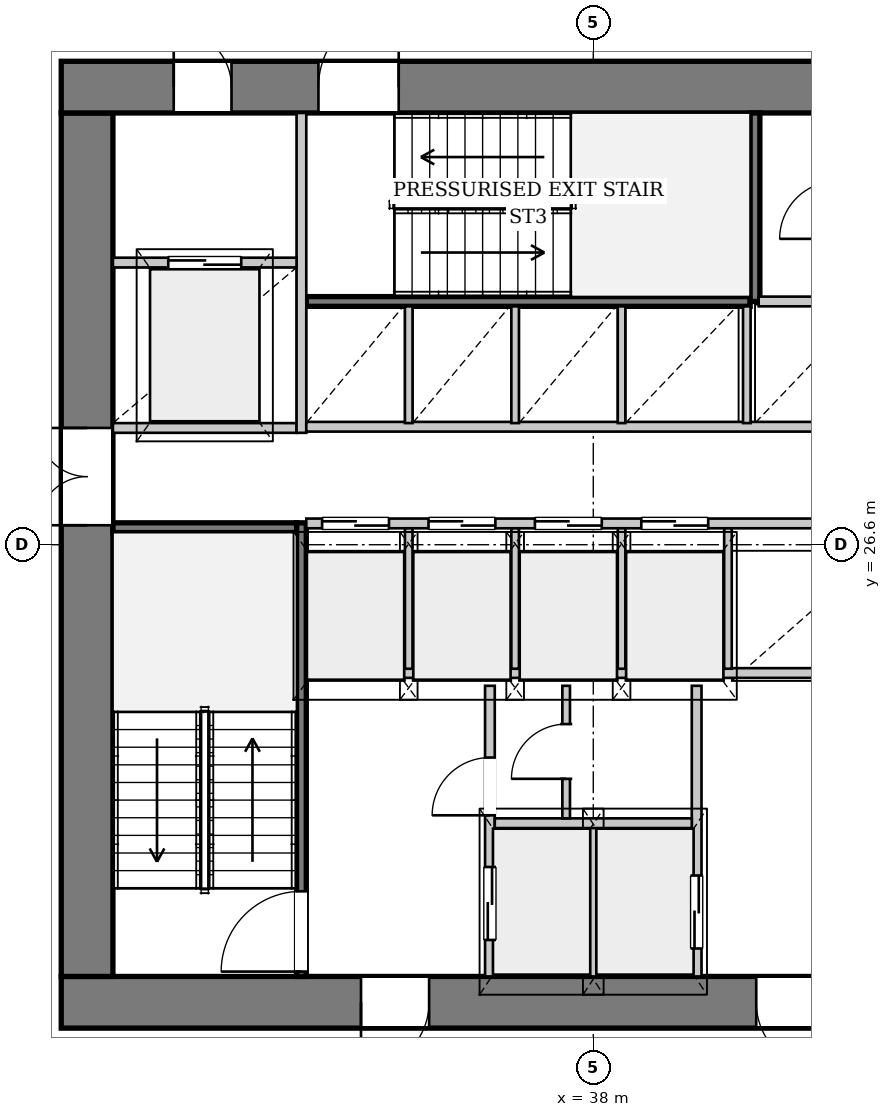
"""IFC4 building model, lengths in metres.
Left out: names, types, materials, properties, quantities, classifications, styles, units other than length and angle.
Written with IfcOpenShell. Run it as: python <this file> out.ifc"""

import sys

from ifc_helpers import new_model, si_unit, direction, frame, frame_2d, origin, place, context, subcontext, project, spatial, rectangle, extrude, source, transform, mapped, element, fill, save


model = new_model("IFC4")
c1 = context("Model", 3, precision=1e-05, world=origin(), true_north=direction((0.0, 1.0)))
c2 = subcontext(c1, "Body", "Model", "MODEL_VIEW")
j1 = project(units=[si_unit("LENGTHUNIT", "METRE"), si_unit("PLANEANGLEUNIT", "RADIAN")], contexts=[c1])
p1 = place(None, origin())
s1 = spatial("IfcSite", under=j1, at=p1, CompositionType="ELEMENT")
p2 = place(p1, origin())
s2 = spatial("IfcBuilding", under=s1, at=p2, CompositionType="ELEMENT")
p3 = place(p2, frame((0.0, 0.0, 61.25)))
s3 = spatial("IfcBuildingStorey", under=s2, at=p3, CompositionType="ELEMENT", Elevation=61.25)
p4 = place(p3, frame((46.75, 19.075, 0.0), z_axis=(0.0, 0.0, 1.0), x_axis=(-1.0, 0.0, 0.0)))
e1 = element("IfcWall", 1, at=p4, inside=s3, PredefinedType="SHEAR", context=c2, shape_type="SweptSolid", body=[
    extrude(rectangle(XDim=17.5, YDim=0.85, at=frame_2d((8.75, 0.0))), origin(), (0.0, 0.0, 1.0), 3.3),
])
p5 = place(p4, frame((4.95, 0.0, 0.0)))
e2 = element("IfcOpeningElement", 2, at=p5, cuts=e1, PredefinedType="OPENING", context=c2, shape_type="SweptSolid", body=[
    extrude(rectangle(XDim=1.12, YDim=2.25, at=frame_2d((0.56, 1.125))), frame((0.0, 0.435, 0.0), z_axis=(0.0, -1.0, 0.0), x_axis=(1.0, 0.0, 0.0)), (0.0, 0.0, 1.0), 0.87),
])
p6 = place(p4, frame((11.45, 0.0, 0.0)))
e3 = element("IfcOpeningElement", 3, at=p6, cuts=e1, PredefinedType="OPENING", context=c2, shape_type="SweptSolid", body=[
    extrude(rectangle(XDim=1.12, YDim=2.25, at=frame_2d((0.56, 1.125))), frame((0.0, 0.435, 0.0), z_axis=(0.0, -1.0, 0.0), x_axis=(1.0, 0.0, 0.0)), (0.0, 0.0, 1.0), 0.87),
])
p7 = place(p3, frame((29.675, 19.5, 0.0), z_axis=(0.0, 0.0, 1.0), x_axis=(0.0, 1.0, 0.0)))
e4 = element("IfcWall", 4, at=p7, inside=s3, PredefinedType="SHEAR", context=c2, shape_type="SweptSolid", body=[
    extrude(rectangle(XDim=14.2, YDim=0.85, at=frame_2d((7.1, 0.0))), origin(), (0.0, 0.0, 1.0), 3.3),
])
p8 = place(p7, frame((7.42, 0.0, 0.0)))
e5 = element("IfcOpeningElement", 5, at=p8, cuts=e4, PredefinedType="OPENING", context=c2, shape_type="SweptSolid", body=[
    extrude(rectangle(XDim=1.6, YDim=2.2, at=frame_2d((0.8, 1.1))), frame((0.0, 0.435, 0.0), z_axis=(0.0, -1.0, 0.0), x_axis=(1.0, 0.0, 0.0)), (0.0, 0.0, 1.0), 0.87),
])
p9 = place(p3, frame((29.25, 34.125, 0.0), z_axis=(0.0, 0.0, 1.0), x_axis=(1.0, 0.0, 0.0)))
e6 = element("IfcWall", 6, at=p9, inside=s3, PredefinedType="SHEAR", context=c2, shape_type="SweptSolid", body=[
    extrude(rectangle(XDim=17.5, YDim=0.85, at=frame_2d((8.75, 0.0))), origin(), (0.0, 0.0, 1.0), 3.3),
])
p10 = place(p9, frame((1.85, 0.0, 0.0)))
e7 = element("IfcOpeningElement", 7, at=p10, cuts=e6, PredefinedType="OPENING", context=c2, shape_type="SweptSolid", body=[
    extrude(rectangle(XDim=0.95, YDim=2.1, at=frame_2d((0.475, 1.05))), frame((0.0, 0.435, 0.0), z_axis=(0.0, -1.0, 0.0), x_axis=(1.0, 0.0, 0.0)), (0.0, 0.0, 1.0), 0.87),
])
p11 = place(p9, frame((4.23, 0.0, 0.0)))
e8 = element("IfcOpeningElement", 8, at=p11, cuts=e6, PredefinedType="OPENING", context=c2, shape_type="SweptSolid", body=[
    extrude(rectangle(XDim=1.32, YDim=2.2, at=frame_2d((0.66, 1.1))), frame((0.0, 0.435, 0.0), z_axis=(0.0, -1.0, 0.0), x_axis=(1.0, 0.0, 0.0)), (0.0, 0.0, 1.0), 0.87),
])
p12 = place(p9, frame((15.3, 0.0, 0.0)))
e9 = element("IfcOpeningElement", 9, at=p12, cuts=e6, PredefinedType="OPENING", context=c2, shape_type="SweptSolid", body=[
    extrude(rectangle(XDim=0.95, YDim=2.1, at=frame_2d((0.475, 1.05))), frame((0.0, 0.435, 0.0), z_axis=(0.0, -1.0, 0.0), x_axis=(1.0, 0.0, 0.0)), (0.0, 0.0, 1.0), 0.87),
])
p13 = place(p3, frame((33.2, 19.5, 0.0), z_axis=(0.0, 0.0, 1.0), x_axis=(0.0, 1.0, 0.0)))
e10 = element("IfcWall", 10, at=p13, inside=s3, PredefinedType="PARTITIONING", context=c2, shape_type="SweptSolid", body=[
    extrude(rectangle(XDim=7.46, YDim=0.16, at=frame_2d((3.73, 0.0))), origin(), (0.0, 0.0, 1.0), 3.3),
])
p14 = place(p13, frame((0.08, 0.0, 0.0)))
e11 = element("IfcOpeningElement", 11, at=p14, cuts=e10, PredefinedType="OPENING", context=c2, shape_type="SweptSolid", body=[
    extrude(rectangle(XDim=1.32, YDim=2.2, at=frame_2d((0.66, 1.1))), frame((0.0, 0.09, 0.0), z_axis=(0.0, -1.0, 0.0), x_axis=(1.0, 0.0, 0.0)), (0.0, 0.0, 1.0), 0.18),
])
p15 = place(p3, frame((30.1, 26.88, 0.0), z_axis=(0.0, 0.0, 1.0), x_axis=(1.0, 0.0, 0.0)))
e12 = element("IfcWall", 12, at=p15, inside=s3, PredefinedType="PARTITIONING", context=c2, shape_type="SweptSolid", body=[
    extrude(rectangle(XDim=3.02, YDim=0.16, at=frame_2d((1.51, 0.0))), origin(), (0.0, 0.0, 1.0), 3.3),
])
p16 = place(p3, frame((33.28, 30.6, 0.0), z_axis=(0.0, 0.0, 1.0), x_axis=(1.0, 0.0, 0.0)))
e13 = element("IfcWall", 13, at=p16, inside=s3, PredefinedType="PARTITIONING", context=c2, shape_type="SweptSolid", body=[
    extrude(rectangle(XDim=7.3, YDim=0.16, at=frame_2d((3.65, 0.0))), origin(), (0.0, 0.0, 1.0), 3.3),
])
p17 = place(p3, frame((40.66, 30.6, 0.0), z_axis=(0.0, 0.0, 1.0), x_axis=(0.0, 1.0, 0.0)))
e14 = element("IfcWall", 14, at=p17, inside=s3, PredefinedType="PARTITIONING", context=c2, shape_type="SweptSolid", body=[
    extrude(rectangle(XDim=3.1, YDim=0.16, at=frame_2d((1.55, 0.0))), origin(), (0.0, 0.0, 1.0), 3.3),
])
p18 = place(p3, frame((36.3, 19.5, 0.0), z_axis=(0.0, 0.0, 1.0), x_axis=(0.0, 1.0, 0.0)))
e15 = element("IfcWall", 15, at=p18, inside=s3, PredefinedType="PARTITIONING", context=c2, shape_type="SweptSolid", body=[
    extrude(rectangle(XDim=4.78, YDim=0.16, at=frame_2d((2.39, 0.0))), origin(), (0.0, 0.0, 1.0), 3.3),
])
p19 = place(p18, frame((0.6, 0.0, 0.0)))
e16 = element("IfcOpeningElement", 16, at=p19, cuts=e15, PredefinedType="OPENING", context=c2, shape_type="SweptSolid", body=[
    extrude(rectangle(XDim=1.2, YDim=2.2, at=frame_2d((0.6, 1.1))), frame((0.0, 0.09, 0.0), z_axis=(0.0, -1.0, 0.0), x_axis=(1.0, 0.0, 0.0)), (0.0, 0.0, 1.0), 0.18),
])
p20 = place(p18, frame((2.65, 0.0, 0.0)))
e17 = element("IfcOpeningElement", 17, at=p20, cuts=e15, PredefinedType="OPENING", context=c2, shape_type="SweptSolid", body=[
    extrude(rectangle(XDim=0.95, YDim=2.1, at=frame_2d((0.475, 1.05))), frame((0.0, 0.09, 0.0), z_axis=(0.0, -1.0, 0.0), x_axis=(1.0, 0.0, 0.0)), (0.0, 0.0, 1.0), 0.18),
])
p21 = place(p3, frame((39.7, 24.28, 0.0), z_axis=(0.0, 0.0, 1.0), x_axis=(0.0, -1.0, 0.0)))
e18 = element("IfcWall", 18, at=p21, inside=s3, PredefinedType="PARTITIONING", context=c2, shape_type="SweptSolid", body=[
    extrude(rectangle(XDim=4.78, YDim=0.16, at=frame_2d((2.39, 0.0))), origin(), (0.0, 0.0, 1.0), 3.3),
])
p22 = place(p21, frame((3.12, 0.0, 0.0)))
e19 = element("IfcOpeningElement", 19, at=p22, cuts=e18, PredefinedType="OPENING", context=c2, shape_type="SweptSolid", body=[
    extrude(rectangle(XDim=1.2, YDim=2.2, at=frame_2d((0.6, 1.1))), frame((0.0, 0.09, 0.0), z_axis=(0.0, -1.0, 0.0), x_axis=(1.0, 0.0, 0.0)), (0.0, 0.0, 1.0), 0.18),
])
p23 = place(p3, frame((38.0, 19.5, 0.0), z_axis=(0.0, 0.0, 1.0), x_axis=(0.0, 1.0, 0.0)))
e20 = element("IfcWall", 20, at=p23, inside=s3, PredefinedType="PARTITIONING", context=c2, shape_type="SweptSolid", body=[
    extrude(rectangle(XDim=2.46, YDim=0.125, at=frame_2d((1.23, 0.0))), origin(), (0.0, 0.0, 1.0), 3.3),
])
p24 = place(p3, frame((36.38, 22.02, 0.0), z_axis=(0.0, 0.0, 1.0), x_axis=(1.0, 0.0, 0.0)))
e21 = element("IfcWall", 21, at=p24, inside=s3, PredefinedType="PARTITIONING", context=c2, shape_type="SweptSolid", body=[
    extrude(rectangle(XDim=3.24, YDim=0.16, at=frame_2d((1.62, 0.0))), origin(), (0.0, 0.0, 1.0), 3.3),
])
p25 = place(p3, frame((33.28, 24.49, 0.0), z_axis=(0.0, 0.0, 1.0), x_axis=(1.0, 0.0, 0.0)))
e22 = element("IfcWall", 22, at=p25, inside=s3, PredefinedType="PARTITIONING", context=c2, shape_type="SweptSolid", body=[
    extrude(rectangle(XDim=9.44, YDim=0.16, at=frame_2d((4.72, 0.0))), origin(), (0.0, 0.0, 1.0), 3.3),
])
p26 = place(p3, frame((37.554, 22.1, 0.0), z_axis=(0.0, 0.0, 1.0), x_axis=(0.0, 1.0, 0.0)))
e23 = element("IfcWall", 23, at=p26, inside=s3, PredefinedType="PARTITIONING", context=c2, shape_type="SweptSolid", body=[
    extrude(rectangle(XDim=2.18, YDim=0.125, at=frame_2d((1.09, 0.0))), origin(), (0.0, 0.0, 1.0), 3.3),
])
p27 = place(p26, frame((0.65, 0.0, 0.0)))
e24 = element("IfcOpeningElement", 24, at=p27, cuts=e23, PredefinedType="OPENING", context=c2, shape_type="SweptSolid", body=[
    extrude(rectangle(XDim=0.9, YDim=2.1, at=frame_2d((0.45, 1.05))), frame((0.0, 0.073, 0.0), z_axis=(0.0, -1.0, 0.0), x_axis=(1.0, 0.0, 0.0)), (0.0, 0.0, 1.0), 0.145),
])
p28 = place(p3, frame((30.1, 28.52, 0.0), z_axis=(0.0, 0.0, 1.0), x_axis=(1.0, 0.0, 0.0)))
e25 = element("IfcWall", 25, at=p28, inside=s3, PredefinedType="PARTITIONING", context=c2, shape_type="SweptSolid", body=[
    extrude(rectangle(XDim=3.02, YDim=0.16, at=frame_2d((1.51, 0.0))), origin(), (0.0, 0.0, 1.0), 3.3),
])
p29 = place(p3, frame((33.2, 28.44, 0.0), z_axis=(0.0, 0.0, 1.0), x_axis=(0.0, 1.0, 0.0)))
e26 = element("IfcWall", 26, at=p29, inside=s3, PredefinedType="PARTITIONING", context=c2, shape_type="SweptSolid", body=[
    extrude(rectangle(XDim=5.26, YDim=0.16, at=frame_2d((2.63, 0.0))), origin(), (0.0, 0.0, 1.0), 3.3),
])
p30 = place(p3, frame((30.1, 31.24, 0.0), z_axis=(0.0, 0.0, 1.0), x_axis=(1.0, 0.0, 0.0)))
e27 = element("IfcWall", 27, at=p30, inside=s3, PredefinedType="PARTITIONING", context=c2, shape_type="SweptSolid", body=[
    extrude(rectangle(XDim=3.02, YDim=0.16, at=frame_2d((1.51, 0.0))), origin(), (0.0, 0.0, 1.0), 3.3),
])
p31 = place(p30, frame((0.91, 0.0, 0.0)))
e28 = element("IfcOpeningElement", 28, at=p31, cuts=e27, PredefinedType="OPENING", context=c2, shape_type="SweptSolid", body=[
    extrude(rectangle(XDim=1.2, YDim=2.2, at=frame_2d((0.6, 1.1))), frame((0.0, 0.09, 0.0), z_axis=(0.0, -1.0, 0.0), x_axis=(1.0, 0.0, 0.0)), (0.0, 0.0, 1.0), 0.18),
])
p32 = place(p3, frame((33.28, 26.95, 0.0), z_axis=(0.0, 0.0, 1.0), x_axis=(1.0, 0.0, 0.0)))
e29 = element("IfcWall", 29, at=p32, inside=s3, PredefinedType="PARTITIONING", context=c2, shape_type="SweptSolid", body=[
    extrude(rectangle(XDim=9.44, YDim=0.16, at=frame_2d((4.72, 0.0))), origin(), (0.0, 0.0, 1.0), 3.3),
])
p33 = place(p32, frame((0.26, 0.0, 0.0)))
e30 = element("IfcOpeningElement", 30, at=p33, cuts=e29, PredefinedType="OPENING", context=c2, shape_type="SweptSolid", body=[
    extrude(rectangle(XDim=1.1, YDim=2.2, at=frame_2d((0.55, 1.1))), frame((0.0, 0.09, 0.0), z_axis=(0.0, -1.0, 0.0), x_axis=(1.0, 0.0, 0.0)), (0.0, 0.0, 1.0), 0.18),
])
p34 = place(p32, frame((2.01, 0.0, 0.0)))
e31 = element("IfcOpeningElement", 31, at=p34, cuts=e29, PredefinedType="OPENING", context=c2, shape_type="SweptSolid", body=[
    extrude(rectangle(XDim=1.1, YDim=2.2, at=frame_2d((0.55, 1.1))), frame((0.0, 0.09, 0.0), z_axis=(0.0, -1.0, 0.0), x_axis=(1.0, 0.0, 0.0)), (0.0, 0.0, 1.0), 0.18),
])
p35 = place(p32, frame((3.76, 0.0, 0.0)))
e32 = element("IfcOpeningElement", 32, at=p35, cuts=e29, PredefinedType="OPENING", context=c2, shape_type="SweptSolid", body=[
    extrude(rectangle(XDim=1.1, YDim=2.2, at=frame_2d((0.55, 1.1))), frame((0.0, 0.09, 0.0), z_axis=(0.0, -1.0, 0.0), x_axis=(1.0, 0.0, 0.0)), (0.0, 0.0, 1.0), 0.18),
])
p36 = place(p32, frame((5.51, 0.0, 0.0)))
e33 = element("IfcOpeningElement", 33, at=p36, cuts=e29, PredefinedType="OPENING", context=c2, shape_type="SweptSolid", body=[
    extrude(rectangle(XDim=1.1, YDim=2.2, at=frame_2d((0.55, 1.1))), frame((0.0, 0.09, 0.0), z_axis=(0.0, -1.0, 0.0), x_axis=(1.0, 0.0, 0.0)), (0.0, 0.0, 1.0), 0.18),
])
for number, where, z_axis, x_axis in (
    (34, (34.965, 24.56, 0.0), (0.0, 0.0, 1.0), (0.0, 1.0, 0.0)),
    (35, (36.715, 24.56, 0.0), (0.0, 0.0, 1.0), (0.0, 1.0, 0.0)),
    (36, (38.465, 24.56, 0.0), (0.0, 0.0, 1.0), (0.0, 1.0, 0.0)),
    (37, (40.215, 24.56, 0.0), (0.0, 0.0, 1.0), (0.0, 1.0, 0.0)),
):
    element("IfcWall", number, at=place(p3, frame(where, z_axis=z_axis, x_axis=x_axis)), inside=s3, PredefinedType="PARTITIONING", context=c2, shape_type="SweptSolid", body=[
        extrude(rectangle(XDim=2.31, YDim=0.125, at=frame_2d((1.155, 0.0))), origin(), (0.0, 0.0, 1.0), 3.3),
    ])
p37 = place(p3, frame((33.28, 28.54, 0.0), z_axis=(0.0, 0.0, 1.0), x_axis=(1.0, 0.0, 0.0)))
e38 = element("IfcWall", 38, at=p37, inside=s3, PredefinedType="PARTITIONING", context=c2, shape_type="SweptSolid", body=[
    extrude(rectangle(XDim=12.62, YDim=0.16, at=frame_2d((6.31, 0.0))), origin(), (0.0, 0.0, 1.0), 3.3),
])
p38 = place(p3, frame((40.72, 30.6, 0.0), z_axis=(0.0, 0.0, 1.0), x_axis=(1.0, 0.0, 0.0)))
e39 = element("IfcWall", 39, at=p38, inside=s3, PredefinedType="PARTITIONING", context=c2, shape_type="SweptSolid", body=[
    extrude(rectangle(XDim=5.18, YDim=0.16, at=frame_2d((2.59, 0.0))), origin(), (0.0, 0.0, 1.0), 3.3),
])
for number, where, z_axis, x_axis in (
    (40, (34.965, 28.6, 0.0), (0.0, 0.0, 1.0), (0.0, 1.0, 0.0)),
    (41, (36.715, 28.6, 0.0), (0.0, 0.0, 1.0), (0.0, 1.0, 0.0)),
    (42, (38.465, 28.6, 0.0), (0.0, 0.0, 1.0), (0.0, 1.0, 0.0)),
    (43, (40.525, 28.6, 0.0), (0.0, 0.0, 1.0), (0.0, 1.0, 0.0)),
):
    element("IfcWall", number, at=place(p3, frame(where, z_axis=z_axis, x_axis=x_axis)), inside=s3, PredefinedType="PARTITIONING", context=c2, shape_type="SweptSolid", body=[
        extrude(rectangle(XDim=1.92, YDim=0.125, at=frame_2d((0.96, 0.0))), origin(), (0.0, 0.0, 1.0), 3.3),
    ])
m1 = source(origin(), c2, "Body", "SweptSolid", [
    extrude(rectangle(XDim=1.12, YDim=2.25, at=frame_2d((0.56, 1.125))), frame((0.0, 0.025, 0.0), z_axis=(0.0, -1.0, 0.0), x_axis=(1.0, 0.0, 0.0)), (0.0, 0.0, 1.0), 0.05),
])
p39 = place(p5, origin())
e44 = element("IfcDoor", 44, at=p39, inside=s3, OperationType="SINGLE_SWING_LEFT", PredefinedType="DOOR", context=c2, shape_type="MappedRepresentation", body=[
    mapped(m1, transform((0.0, 0.0, 0.0), x_axis=(1.0, 0.0, 0.0), y_axis=(0.0, 1.0, 0.0), z_axis=(0.0, 0.0, 1.0), scale=1.0)),
])
fill(e2, e44)
p40 = place(p6, origin())
e45 = element("IfcDoor", 45, at=p40, inside=s3, OperationType="SINGLE_SWING_RIGHT", PredefinedType="DOOR", context=c2, shape_type="MappedRepresentation", body=[
    mapped(m1, transform((0.0, 0.0, 0.0), x_axis=(1.0, 0.0, 0.0), y_axis=(0.0, 1.0, 0.0), z_axis=(0.0, 0.0, 1.0), scale=1.0)),
])
fill(e3, e45)
m2 = source(origin(), c2, "Body", "SweptSolid", [
    extrude(rectangle(XDim=1.6, YDim=2.2, at=frame_2d((0.8, 1.1))), frame((0.0, 0.025, 0.0), z_axis=(0.0, -1.0, 0.0), x_axis=(1.0, 0.0, 0.0)), (0.0, 0.0, 1.0), 0.05),
])
p41 = place(p8, origin())
e46 = element("IfcDoor", 46, at=p41, inside=s3, OperationType="DOUBLE_DOOR_SINGLE_SWING", PredefinedType="DOOR", context=c2, shape_type="MappedRepresentation", body=[
    mapped(m2, transform((0.0, 0.0, 0.0), x_axis=(1.0, 0.0, 0.0), y_axis=(0.0, 1.0, 0.0), z_axis=(0.0, 0.0, 1.0), scale=1.0)),
])
fill(e5, e46)
m3 = source(origin(), c2, "Body", "SweptSolid", [
    extrude(rectangle(XDim=0.95, YDim=2.1, at=frame_2d((0.475, 1.05))), frame((0.0, 0.025, 0.0), z_axis=(0.0, -1.0, 0.0), x_axis=(1.0, 0.0, 0.0)), (0.0, 0.0, 1.0), 0.05),
])
p42 = place(p10, origin())
e47 = element("IfcDoor", 47, at=p42, inside=s3, OperationType="SINGLE_SWING_LEFT", PredefinedType="DOOR", context=c2, shape_type="MappedRepresentation", body=[
    mapped(m3, transform((0.0, 0.0, 0.0), x_axis=(1.0, 0.0, 0.0), y_axis=(0.0, 1.0, 0.0), z_axis=(0.0, 0.0, 1.0), scale=1.0)),
])
fill(e7, e47)
m4 = source(origin(), c2, "Body", "SweptSolid", [
    extrude(rectangle(XDim=1.32, YDim=2.2, at=frame_2d((0.66, 1.1))), frame((0.0, 0.025, 0.0), z_axis=(0.0, -1.0, 0.0), x_axis=(1.0, 0.0, 0.0)), (0.0, 0.0, 1.0), 0.05),
])
p43 = place(p11, origin())
e48 = element("IfcDoor", 48, at=p43, inside=s3, OperationType="SINGLE_SWING_RIGHT", PredefinedType="DOOR", context=c2, shape_type="MappedRepresentation", body=[
    mapped(m4, transform((0.0, 0.0, 0.0), x_axis=(1.0, 0.0, 0.0), y_axis=(0.0, 1.0, 0.0), z_axis=(0.0, 0.0, 1.0), scale=1.0)),
])
fill(e8, e48)
p44 = place(p14, origin())
e49 = element("IfcDoor", 49, at=p44, inside=s3, OperationType="SINGLE_SWING_LEFT", PredefinedType="DOOR", context=c2, shape_type="MappedRepresentation", body=[
    mapped(m4, transform((0.0, 0.0, 0.0), x_axis=(1.0, 0.0, 0.0), y_axis=(0.0, 1.0, 0.0), z_axis=(0.0, 0.0, 1.0), scale=1.0)),
])
fill(e11, e49)
m5 = source(origin(), c2, "Body", "SweptSolid", [
    extrude(rectangle(XDim=1.2, YDim=2.2, at=frame_2d((0.6, 1.1))), frame((0.0, 0.025, 0.0), z_axis=(0.0, -1.0, 0.0), x_axis=(1.0, 0.0, 0.0)), (0.0, 0.0, 1.0), 0.05),
])
p45 = place(p19, origin())
e50 = element("IfcDoor", 50, at=p45, inside=s3, OperationType="DOUBLE_DOOR_SLIDING", PredefinedType="DOOR", context=c2, shape_type="MappedRepresentation", body=[
    mapped(m5, transform((0.0, 0.0, 0.0), x_axis=(1.0, 0.0, 0.0), y_axis=(0.0, 1.0, 0.0), z_axis=(0.0, 0.0, 1.0), scale=1.0)),
])
fill(e16, e50)
p46 = place(p20, origin())
e51 = element("IfcDoor", 51, at=p46, inside=s3, OperationType="SINGLE_SWING_LEFT", PredefinedType="DOOR", context=c2, shape_type="MappedRepresentation", body=[
    mapped(m3, transform((0.0, 0.0, 0.0), x_axis=(1.0, 0.0, 0.0), y_axis=(0.0, 1.0, 0.0), z_axis=(0.0, 0.0, 1.0), scale=1.0)),
])
fill(e17, e51)
m6 = source(origin(), c2, "Body", "SweptSolid", [
    extrude(rectangle(XDim=0.9, YDim=2.1, at=frame_2d((0.45, 1.05))), frame((0.0, 0.025, 0.0), z_axis=(0.0, -1.0, 0.0), x_axis=(1.0, 0.0, 0.0)), (0.0, 0.0, 1.0), 0.05),
])
p47 = place(p27, origin())
e52 = element("IfcDoor", 52, at=p47, inside=s3, OperationType="SINGLE_SWING_LEFT", PredefinedType="DOOR", context=c2, shape_type="MappedRepresentation", body=[
    mapped(m6, transform((0.0, 0.0, 0.0), x_axis=(1.0, 0.0, 0.0), y_axis=(0.0, 1.0, 0.0), z_axis=(0.0, 0.0, 1.0), scale=1.0)),
])
fill(e24, e52)
p48 = place(p22, origin())
e53 = element("IfcDoor", 53, at=p48, inside=s3, OperationType="DOUBLE_DOOR_SLIDING", PredefinedType="DOOR", context=c2, shape_type="MappedRepresentation", body=[
    mapped(m5, transform((0.0, 0.0, 0.0), x_axis=(1.0, 0.0, 0.0), y_axis=(0.0, 1.0, 0.0), z_axis=(0.0, 0.0, 1.0), scale=1.0)),
])
fill(e19, e53)
p49 = place(p31, origin())
e54 = element("IfcDoor", 54, at=p49, inside=s3, OperationType="DOUBLE_DOOR_SLIDING", PredefinedType="DOOR", context=c2, shape_type="MappedRepresentation", body=[
    mapped(m5, transform((0.0, 0.0, 0.0), x_axis=(1.0, 0.0, 0.0), y_axis=(0.0, 1.0, 0.0), z_axis=(0.0, 0.0, 1.0), scale=1.0)),
])
fill(e28, e54)
m7 = source(origin(), c2, "Body", "SweptSolid", [
    extrude(rectangle(XDim=1.1, YDim=2.2, at=frame_2d((0.55, 1.1))), frame((0.0, 0.025, 0.0), z_axis=(0.0, -1.0, 0.0), x_axis=(1.0, 0.0, 0.0)), (0.0, 0.0, 1.0), 0.05),
])
p50 = place(p33, origin())
e55 = element("IfcDoor", 55, at=p50, inside=s3, OperationType="DOUBLE_DOOR_SLIDING", PredefinedType="DOOR", context=c2, shape_type="MappedRepresentation", body=[
    mapped(m7, transform((0.0, 0.0, 0.0), x_axis=(1.0, 0.0, 0.0), y_axis=(0.0, 1.0, 0.0), z_axis=(0.0, 0.0, 1.0), scale=1.0)),
])
fill(e30, e55)
p51 = place(p34, origin())
e56 = element("IfcDoor", 56, at=p51, inside=s3, OperationType="DOUBLE_DOOR_SLIDING", PredefinedType="DOOR", context=c2, shape_type="MappedRepresentation", body=[
    mapped(m7, transform((0.0, 0.0, 0.0), x_axis=(1.0, 0.0, 0.0), y_axis=(0.0, 1.0, 0.0), z_axis=(0.0, 0.0, 1.0), scale=1.0)),
])
fill(e31, e56)
p52 = place(p35, origin())
e57 = element("IfcDoor", 57, at=p52, inside=s3, OperationType="DOUBLE_DOOR_SLIDING", PredefinedType="DOOR", context=c2, shape_type="MappedRepresentation", body=[
    mapped(m7, transform((0.0, 0.0, 0.0), x_axis=(1.0, 0.0, 0.0), y_axis=(0.0, 1.0, 0.0), z_axis=(0.0, 0.0, 1.0), scale=1.0)),
])
fill(e32, e57)
p53 = place(p36, origin())
e58 = element("IfcDoor", 58, at=p53, inside=s3, OperationType="DOUBLE_DOOR_SLIDING", PredefinedType="DOOR", context=c2, shape_type="MappedRepresentation", body=[
    mapped(m7, transform((0.0, 0.0, 0.0), x_axis=(1.0, 0.0, 0.0), y_axis=(0.0, 1.0, 0.0), z_axis=(0.0, 0.0, 1.0), scale=1.0)),
])
fill(e33, e58)
save(model, sys.argv[1])
